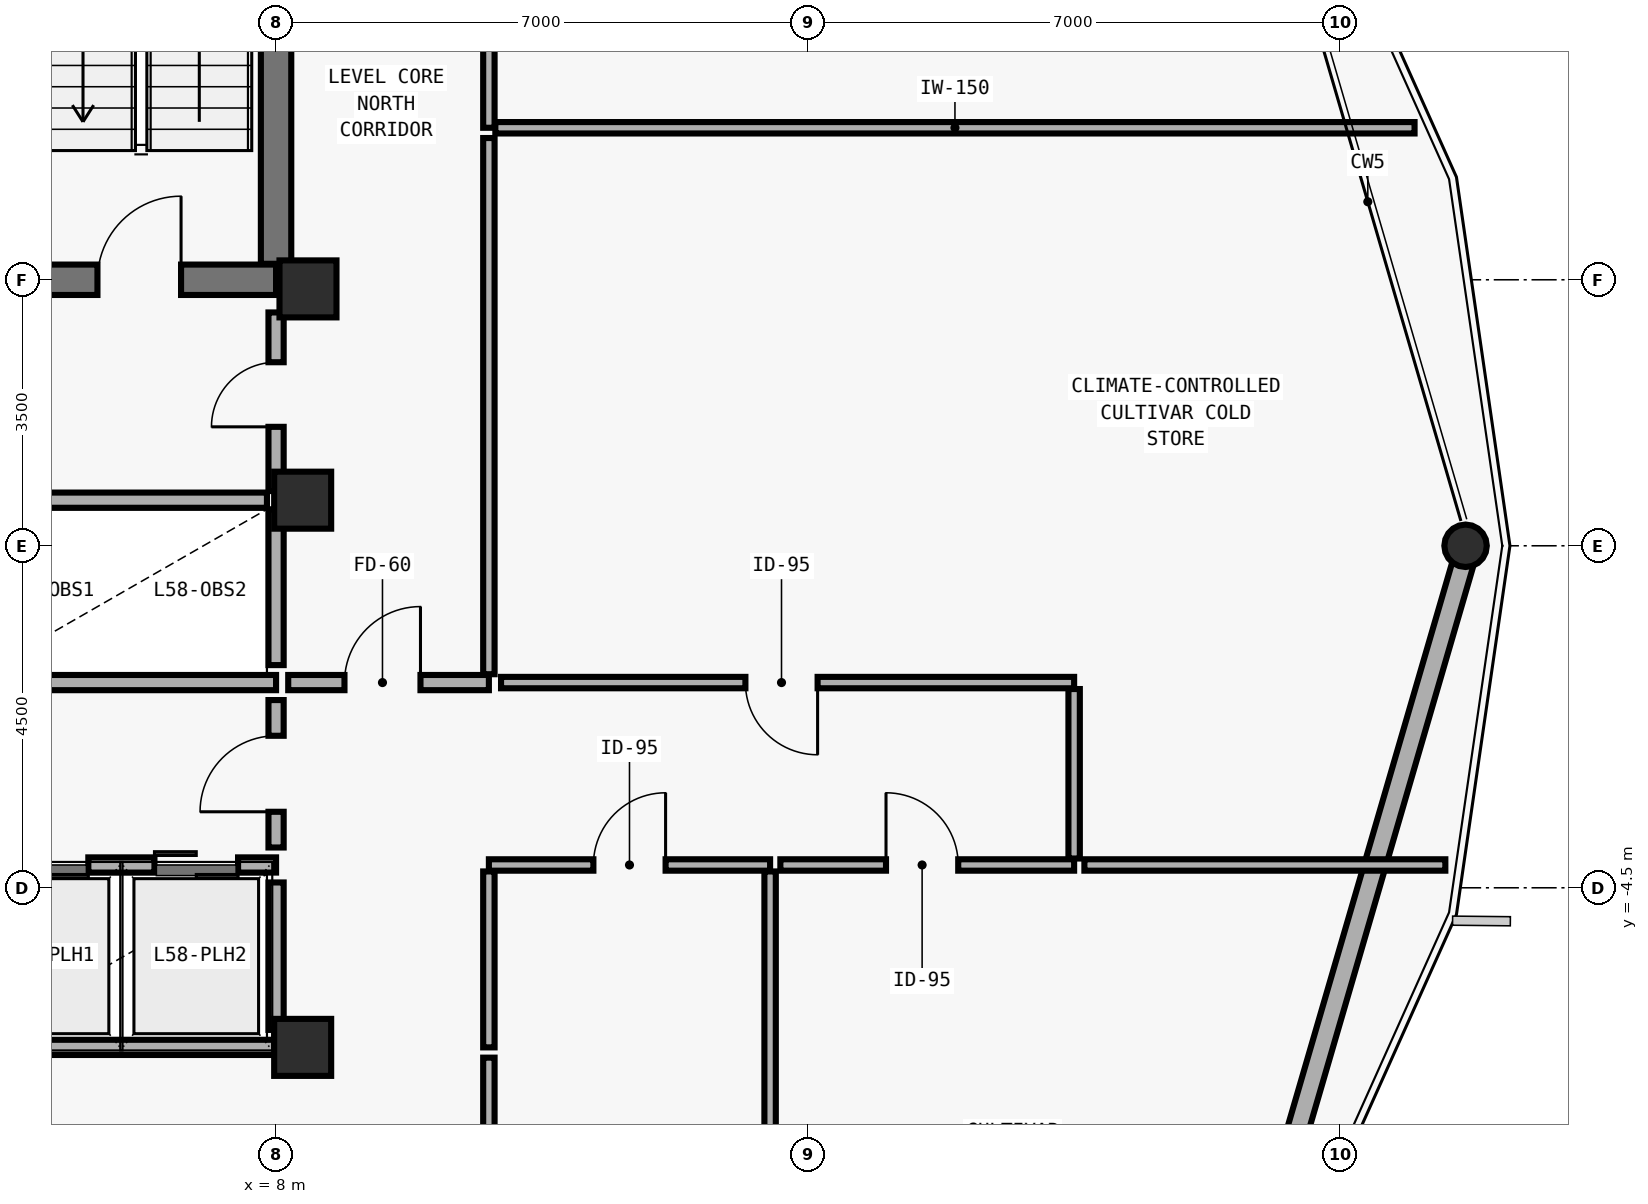
"""IFC4 building model, lengths in metres.
Left out: names, types, materials, properties, quantities, classifications, styles, units other than length and angle.
Written with IfcOpenShell. Run it as: python <this file> out.ifc"""

import sys

from ifc_helpers import new_model, si_unit, direction, frame, frame_2d, origin, origin_2d, place, context, subcontext, project, spatial, rectangle, hollow_circle, extrude, element, fill, save


model = new_model("IFC4")
c1 = context("Model", 3, precision=1e-05, world=origin(), true_north=direction((0.0, 1.0)))
c2 = subcontext(c1, "Body", "Model", "MODEL_VIEW")
j1 = project(units=[si_unit("LENGTHUNIT", "METRE"), si_unit("PLANEANGLEUNIT", "RADIAN")], contexts=[c1])
p1 = place(None, origin())
s1 = spatial("IfcSite", under=j1, at=p1, CompositionType="ELEMENT")
p2 = place(p1, origin())
s2 = spatial("IfcBuilding", under=s1, at=p2, CompositionType="ELEMENT")
p3 = place(p2, frame((0.0, 0.0, 229.2)))
s3 = spatial("IfcBuildingStorey", under=s2, at=p3, CompositionType="ELEMENT", Elevation=229.2)
p4 = place(p3, frame((-2.0, 3.5, 0.0), z_axis=(0.0, 0.0, 1.0), x_axis=(1.0, 0.0, 0.0)))
e1 = element("IfcWall", 1, at=p4, inside=s3, PredefinedType="SHEAR", context=c2, shape_type="SweptSolid", body=[
    extrude(rectangle(XDim=10.0, YDim=0.4, at=frame_2d((5.0, 0.0))), origin(), (0.0, 0.0, 1.0), 3.592),
])
p5 = place(p4, frame((1.65, 0.0, 0.0)))
e2 = element("IfcOpeningElement", 2, at=p5, cuts=e1, PredefinedType="OPENING", context=c2, shape_type="SweptSolid", body=[
    extrude(rectangle(XDim=1.1, YDim=2.15, at=frame_2d((0.55, 1.075))), frame((0.0, 0.21, 0.0), z_axis=(0.0, -1.0, 0.0), x_axis=(1.0, 0.0, 0.0)), (0.0, 0.0, 1.0), 0.42),
])
p6 = place(p4, frame((7.65, 0.0, 0.0)))
e3 = element("IfcOpeningElement", 3, at=p6, cuts=e1, PredefinedType="OPENING", context=c2, shape_type="SweptSolid", body=[
    extrude(rectangle(XDim=1.1, YDim=2.15, at=frame_2d((0.55, 1.075))), frame((0.0, 0.21, 0.0), z_axis=(0.0, -1.0, 0.0), x_axis=(1.0, 0.0, 0.0)), (0.0, 0.0, 1.0), 0.42),
])
p7 = place(p4, frame((3.72, 0.0, 0.0)))
e4 = element("IfcOpeningElement", 4, at=p7, cuts=e1, PredefinedType="OPENING", context=c2, shape_type="SweptSolid", body=[
    extrude(rectangle(XDim=1.1, YDim=2.2, at=frame_2d((0.55, 1.1))), frame((0.0, 0.21, 0.0), z_axis=(0.0, -1.0, 0.0), x_axis=(1.0, 0.0, 0.0)), (0.0, 0.0, 1.0), 0.42),
])
p8 = place(p4, frame((5.18, 0.0, 0.0)))
e5 = element("IfcOpeningElement", 5, at=p8, cuts=e1, PredefinedType="OPENING", context=c2, shape_type="SweptSolid", body=[
    extrude(rectangle(XDim=1.1, YDim=2.2, at=frame_2d((0.55, 1.1))), frame((0.0, 0.21, 0.0), z_axis=(0.0, -1.0, 0.0), x_axis=(1.0, 0.0, 0.0)), (0.0, 0.0, 1.0), 0.42),
])
p9 = place(p3, frame((8.0, 3.71, 0.0), z_axis=(0.0, 0.0, 1.0), x_axis=(0.0, 1.0, 0.0)))
e6 = element("IfcWall", 6, at=p9, inside=s3, PredefinedType="SHEAR", context=c2, shape_type="SweptSolid", body=[
    extrude(rectangle(XDim=8.58, YDim=0.4, at=frame_2d((4.29, 0.0))), origin(), (0.0, 0.0, 1.0), 3.592),
])
for number, where, z_axis, x_axis in (
    (7, (8.42, 3.38, 0.0), (0.0, 0.0, 1.0), (1.0, 0.0, 0.0)),
    (8, (8.35, 0.6, 0.0), (0.0, 0.0, 1.0), (1.0, 0.0, 0.0)),
    (9, (8.35, -6.6, 0.0), (0.0, 0.0, 1.0), (1.0, 0.0, 0.0)),
):
    element("IfcColumn", number, at=place(p3, frame(where, z_axis=z_axis, x_axis=x_axis)), inside=s3, PredefinedType="COLUMN", context=c2, shape_type="SweptSolid", body=[
        extrude(rectangle(XDim=0.75, YDim=0.75, at=origin_2d()), origin(), (0.0, 0.0, 1.0), 3.575),
    ])
p10 = place(p3, frame((23.684, 0.0, 0.0), z_axis=(-0.019050015053, 0.0, 0.999818531998), x_axis=(0.0, -1.0, 0.0)))
e10 = element("IfcColumn", 10, at=p10, inside=s3, PredefinedType="COLUMN", context=c2, shape_type="SweptSolid", body=[
    extrude(hollow_circle(Radius=0.28, WallThickness=0.02, at=origin_2d()), origin(), (0.0, 0.0, 1.0), 3.576),
])
p11 = place(p3, frame((23.618, -0.225, 0.0), z_axis=(0.0, 0.0, 1.0), x_axis=(-0.279948739232, -0.960014949572, 0.0)))
e11 = element("IfcWall", 11, at=p11, inside=s3, PredefinedType="SOLIDWALL", context=c2, shape_type="SweptSolid", body=[
    extrude(rectangle(XDim=8.962, YDim=0.28, at=frame_2d((4.481, 0.0))), origin(), (0.0, 0.0, 1.0), 2.97),
])
p12 = place(p3, frame((4.0, 0.6, 0.0), z_axis=(0.0, 0.0, 1.0), x_axis=(1.0, 0.0, 0.0)))
e12 = element("IfcWall", 12, at=p12, inside=s3, PredefinedType="SOLIDWALL", context=c2, shape_type="SweptSolid", body=[
    extrude(rectangle(XDim=3.88, YDim=0.2, at=frame_2d((1.94, 0.0))), origin(), (0.0, 0.0, 1.0), 3.072),
])
p13 = place(p3, frame((4.0, -1.8, 0.0), z_axis=(0.0, 0.0, 1.0), x_axis=(1.0, 0.0, 0.0)))
e13 = element("IfcWall", 13, at=p13, inside=s3, PredefinedType="SOLIDWALL", context=c2, shape_type="SweptSolid", body=[
    extrude(rectangle(XDim=4.0, YDim=0.2, at=frame_2d((2.0, 0.0))), origin(), (0.0, 0.0, 1.0), 3.36),
])
p14 = place(p3, frame((8.0, -1.57, 0.0), z_axis=(0.0, 0.0, 1.0), x_axis=(0.0, 1.0, 0.0)))
e14 = element("IfcWall", 14, at=p14, inside=s3, PredefinedType="SOLIDWALL", context=c2, shape_type="SweptSolid", body=[
    extrude(rectangle(XDim=2.05, YDim=0.2, at=frame_2d((1.025, 0.0))), origin(), (0.0, 0.0, 1.0), 3.072),
])
p15 = place(p3, frame((4.0, -4.2, 0.0), z_axis=(0.0, 0.0, 1.0), x_axis=(1.0, 0.0, 0.0)))
e15 = element("IfcWall", 15, at=p15, inside=s3, PredefinedType="SOLIDWALL", context=c2, shape_type="SweptSolid", body=[
    extrude(rectangle(XDim=4.0, YDim=0.2, at=frame_2d((2.0, 0.0))), origin(), (0.0, 0.0, 1.0), 3.36),
])
p16 = place(p15, frame((0.43, 0.0, 0.0)))
e16 = element("IfcOpeningElement", 16, at=p16, cuts=e15, PredefinedType="OPENING", context=c2, shape_type="SweptSolid", body=[
    extrude(rectangle(XDim=1.1, YDim=2.2, at=frame_2d((0.55, 1.1))), frame((0.0, 0.11, 0.0), z_axis=(0.0, -1.0, 0.0), x_axis=(1.0, 0.0, 0.0)), (0.0, 0.0, 1.0), 0.22),
])
p17 = place(p15, frame((2.4, 0.0, 0.0)))
e17 = element("IfcOpeningElement", 17, at=p17, cuts=e15, PredefinedType="OPENING", context=c2, shape_type="SweptSolid", body=[
    extrude(rectangle(XDim=1.1, YDim=2.2, at=frame_2d((0.55, 1.1))), frame((0.0, 0.11, 0.0), z_axis=(0.0, -1.0, 0.0), x_axis=(1.0, 0.0, 0.0)), (0.0, 0.0, 1.0), 0.22),
])
p18 = place(p3, frame((4.0, -6.6, 0.0), z_axis=(0.0, 0.0, 1.0), x_axis=(1.0, 0.0, 0.0)))
e18 = element("IfcWall", 18, at=p18, inside=s3, PredefinedType="SOLIDWALL", context=c2, shape_type="SweptSolid", body=[
    extrude(rectangle(XDim=4.0, YDim=0.2, at=frame_2d((2.0, 0.0))), origin(), (0.0, 0.0, 1.0), 3.072),
])
p19 = place(p3, frame((8.0, -6.37, 0.0), z_axis=(0.0, 0.0, 1.0), x_axis=(0.0, 1.0, 0.0)))
e19 = element("IfcWall", 19, at=p19, inside=s3, PredefinedType="SOLIDWALL", context=c2, shape_type="SweptSolid", body=[
    extrude(rectangle(XDim=1.94, YDim=0.2, at=frame_2d((0.97, 0.0))), origin(), (0.0, 0.0, 1.0), 3.072),
])
p20 = place(p3, frame((8.0, 0.72, 0.0), z_axis=(0.0, 0.0, 1.0), x_axis=(0.0, 1.0, 0.0)))
e20 = element("IfcWall", 20, at=p20, inside=s3, PredefinedType="MOVABLE", context=c2, shape_type="SweptSolid", body=[
    extrude(rectangle(XDim=2.35, YDim=0.2, at=frame_2d((1.175, 0.0))), origin(), (0.0, 0.0, 1.0), 2.692),
])
p21 = place(p20, frame((0.845, 0.0, 0.0)))
e21 = element("IfcOpeningElement", 21, at=p21, cuts=e20, PredefinedType="OPENING", context=c2, shape_type="SweptSolid", body=[
    extrude(rectangle(XDim=0.85, YDim=2.1, at=frame_2d((0.425, 1.05))), frame((0.0, 0.11, 0.0), z_axis=(0.0, -1.0, 0.0), x_axis=(1.0, 0.0, 0.0)), (0.0, 0.0, 1.0), 0.22),
])
p22 = place(p3, frame((8.0, -3.97, 0.0), z_axis=(0.0, 0.0, 1.0), x_axis=(0.0, 1.0, 0.0)))
e22 = element("IfcWall", 22, at=p22, inside=s3, PredefinedType="MOVABLE", context=c2, shape_type="SweptSolid", body=[
    extrude(rectangle(XDim=1.94, YDim=0.2, at=frame_2d((0.97, 0.0))), origin(), (0.0, 0.0, 1.0), 3.072),
])
p23 = place(p22, frame((0.47, 0.0, 0.0)))
e23 = element("IfcOpeningElement", 23, at=p23, cuts=e22, PredefinedType="OPENING", context=c2, shape_type="SweptSolid", body=[
    extrude(rectangle(XDim=1.0, YDim=2.1, at=frame_2d((0.5, 1.05))), frame((0.0, 0.11, 0.0), z_axis=(0.0, -1.0, 0.0), x_axis=(1.0, 0.0, 0.0)), (0.0, 0.0, 1.0), 0.22),
])
p24 = place(p3, frame((8.16, -1.8, 0.0), z_axis=(0.0, 0.0, 1.0), x_axis=(1.0, 0.0, 0.0)))
e24 = element("IfcWall", 24, at=p24, inside=s3, PredefinedType="MOVABLE", context=c2, shape_type="SweptSolid", body=[
    extrude(rectangle(XDim=2.64, YDim=0.2, at=frame_2d((1.32, 0.0))), origin(), (0.0, 0.0, 1.0), 3.36),
])
p25 = place(p24, frame((0.74, 0.0, 0.0)))
e25 = element("IfcOpeningElement", 25, at=p25, cuts=e24, PredefinedType="OPENING", context=c2, shape_type="SweptSolid", body=[
    extrude(rectangle(XDim=1.0, YDim=2.1, at=frame_2d((0.5, 1.05))), frame((0.0, 0.11, 0.0), z_axis=(0.0, -1.0, 0.0), x_axis=(1.0, 0.0, 0.0)), (0.0, 0.0, 1.0), 0.22),
])
p26 = place(p3, frame((10.8, -4.2, 0.0), z_axis=(0.0, 0.0, 1.0), x_axis=(1.0, 0.0, 0.0)))
e26 = element("IfcWall", 26, at=p26, inside=s3, PredefinedType="PARTITIONING", context=c2, shape_type="SweptSolid", body=[
    extrude(rectangle(XDim=3.7, YDim=0.15, at=frame_2d((1.85, 0.0))), origin(), (0.0, 0.0, 1.0), 3.36),
])
p27 = place(p26, frame((1.375, 0.0, 0.0)))
e27 = element("IfcOpeningElement", 27, at=p27, cuts=e26, PredefinedType="OPENING", context=c2, shape_type="SweptSolid", body=[
    extrude(rectangle(XDim=0.95, YDim=2.1, at=frame_2d((0.475, 1.05))), frame((0.0, 0.085, 0.0), z_axis=(0.0, -1.0, 0.0), x_axis=(1.0, 0.0, 0.0)), (0.0, 0.0, 1.0), 0.17),
])
p28 = place(p3, frame((14.635, -4.2, 0.0), z_axis=(0.0, 0.0, 1.0), x_axis=(1.0, 0.0, 0.0)))
e28 = element("IfcWall", 28, at=p28, inside=s3, PredefinedType="PARTITIONING", context=c2, shape_type="SweptSolid", body=[
    extrude(rectangle(XDim=3.865, YDim=0.15, at=frame_2d((1.933, 0.0))), origin(), (0.0, 0.0, 1.0), 3.36),
])
p29 = place(p28, frame((1.39, 0.0, 0.0)))
e29 = element("IfcOpeningElement", 29, at=p29, cuts=e28, PredefinedType="OPENING", context=c2, shape_type="SweptSolid", body=[
    extrude(rectangle(XDim=0.95, YDim=2.1, at=frame_2d((0.475, 1.05))), frame((0.0, 0.085, 0.0), z_axis=(0.0, -1.0, 0.0), x_axis=(1.0, 0.0, 0.0)), (0.0, 0.0, 1.0), 0.17),
])
p30 = place(p3, frame((18.5, -1.8, 0.0), z_axis=(0.0, 0.0, 1.0), x_axis=(-1.0, 0.0, 0.0)))
e30 = element("IfcWall", 30, at=p30, inside=s3, PredefinedType="PARTITIONING", context=c2, shape_type="SweptSolid", body=[
    extrude(rectangle(XDim=7.54, YDim=0.15, at=frame_2d((3.77, 0.0))), origin(), (0.0, 0.0, 1.0), 3.36),
])
p31 = place(p30, frame((3.375, 0.0, 0.0)))
e31 = element("IfcOpeningElement", 31, at=p31, cuts=e30, PredefinedType="OPENING", context=c2, shape_type="SweptSolid", body=[
    extrude(rectangle(XDim=0.95, YDim=2.1, at=frame_2d((0.475, 1.05))), frame((0.0, 0.085, 0.0), z_axis=(0.0, -1.0, 0.0), x_axis=(1.0, 0.0, 0.0)), (0.0, 0.0, 1.0), 0.17),
])
p32 = place(p3, frame((10.8, 5.5, 0.0), z_axis=(0.0, 0.0, 1.0), x_axis=(0.0, 1.0, 0.0)))
e32 = element("IfcWall", 32, at=p32, inside=s3, PredefinedType="PARTITIONING", context=c2, shape_type="SweptSolid", body=[
    extrude(rectangle(XDim=7.0, YDim=0.15, at=frame_2d((3.5, 0.0))), origin(), (0.0, 0.0, 1.0), 3.36),
])
p33 = place(p32, frame((3.025, 0.0, 0.0)))
e33 = element("IfcOpeningElement", 33, at=p33, cuts=e32, PredefinedType="OPENING", context=c2, shape_type="SweptSolid", body=[
    extrude(rectangle(XDim=0.95, YDim=2.1, at=frame_2d((0.475, 1.05))), frame((0.0, 0.085, 0.0), z_axis=(0.0, -1.0, 0.0), x_axis=(1.0, 0.0, 0.0)), (0.0, 0.0, 1.0), 0.17),
])
p34 = place(p3, frame((10.8, -6.6, 0.0), z_axis=(0.0, 0.0, 1.0), x_axis=(0.0, 1.0, 0.0)))
e34 = element("IfcWall", 34, at=p34, inside=s3, PredefinedType="PARTITIONING", context=c2, shape_type="SweptSolid", body=[
    extrude(rectangle(XDim=2.315, YDim=0.15, at=frame_2d((1.158, 0.0))), origin(), (0.0, 0.0, 1.0), 3.36),
])
p35 = place(p3, frame((10.8, -8.815, 0.0), z_axis=(0.0, 0.0, 1.0), x_axis=(0.0, 1.0, 0.0)))
e35 = element("IfcWall", 35, at=p35, inside=s3, PredefinedType="PARTITIONING", context=c2, shape_type="SweptSolid", body=[
    extrude(rectangle(XDim=2.08, YDim=0.15, at=frame_2d((1.04, 0.0))), origin(), (0.0, 0.0, 1.0), 3.36),
])
p36 = place(p3, frame((14.5, -4.285, 0.0), z_axis=(0.0, 0.0, 1.0), x_axis=(0.0, -1.0, 0.0)))
e36 = element("IfcWall", 36, at=p36, inside=s3, PredefinedType="PARTITIONING", context=c2, shape_type="SweptSolid", body=[
    extrude(rectangle(XDim=11.554, YDim=0.15, at=frame_2d((5.777, 0.0))), origin(), (0.0, 0.0, 1.0), 3.072),
])
p37 = place(p3, frame((18.635, -4.2, 0.0), z_axis=(0.0, 0.0, 1.0), x_axis=(1.0, 0.0, 0.0)))
e37 = element("IfcWall", 37, at=p37, inside=s3, PredefinedType="PARTITIONING", context=c2, shape_type="SweptSolid", body=[
    extrude(rectangle(XDim=4.749, YDim=0.15, at=frame_2d((2.375, 0.0))), origin(), (0.0, 0.0, 1.0), 3.36),
])
p38 = place(p3, frame((18.5, -4.115, 0.0), z_axis=(0.0, 0.0, 1.0), x_axis=(0.0, 1.0, 0.0)))
e38 = element("IfcWall", 38, at=p38, inside=s3, PredefinedType="PARTITIONING", context=c2, shape_type="SweptSolid", body=[
    extrude(rectangle(XDim=2.23, YDim=0.15, at=frame_2d((1.115, 0.0))), origin(), (0.0, 0.0, 1.0), 3.36),
])
p39 = place(p3, frame((10.8, -1.69, 0.0), z_axis=(0.0, 0.0, 1.0), x_axis=(0.0, 1.0, 0.0)))
e39 = element("IfcWall", 39, at=p39, inside=s3, PredefinedType="PARTITIONING", context=c2, shape_type="SweptSolid", body=[
    extrude(rectangle(XDim=7.055, YDim=0.15, at=frame_2d((3.527, 0.0))), origin(), (0.0, 0.0, 1.0), 3.36),
])
p40 = place(p3, frame((10.885, 5.5, 0.0), z_axis=(0.0, 0.0, 1.0), x_axis=(1.0, 0.0, 0.0)))
e40 = element("IfcWall", 40, at=p40, inside=s3, PredefinedType="PARTITIONING", context=c2, shape_type="SweptSolid", body=[
    extrude(rectangle(XDim=12.094, YDim=0.15, at=frame_2d((6.047, 0.0))), origin(), (0.0, 0.0, 1.0), 3.36),
])
p41 = place(p6, origin())
e41 = element("IfcDoor", 41, at=p41, inside=s3, OperationType="SINGLE_SWING_RIGHT", PredefinedType="DOOR", context=c2, shape_type="SweptSolid", body=[
    extrude(rectangle(XDim=1.1, YDim=2.15, at=frame_2d((0.55, 1.075))), frame((0.0, 0.025, 0.0), z_axis=(0.0, -1.0, 0.0), x_axis=(1.0, 0.0, 0.0)), (0.0, 0.0, 1.0), 0.05),
])
fill(e3, e41)
p42 = place(p21, origin())
e42 = element("IfcDoor", 42, at=p42, inside=s3, OperationType="SINGLE_SWING_LEFT", PredefinedType="DOOR", context=c2, shape_type="SweptSolid", body=[
    extrude(rectangle(XDim=0.85, YDim=2.1, at=frame_2d((0.425, 1.05))), frame((0.0, 0.025, 0.0), z_axis=(0.0, -1.0, 0.0), x_axis=(1.0, 0.0, 0.0)), (0.0, 0.0, 1.0), 0.05),
])
fill(e21, e42)
p43 = place(p23, origin())
e43 = element("IfcDoor", 43, at=p43, inside=s3, OperationType="SINGLE_SWING_LEFT", PredefinedType="DOOR", context=c2, shape_type="SweptSolid", body=[
    extrude(rectangle(XDim=1.0, YDim=2.1, at=frame_2d((0.5, 1.05))), frame((0.0, 0.025, 0.0), z_axis=(0.0, -1.0, 0.0), x_axis=(1.0, 0.0, 0.0)), (0.0, 0.0, 1.0), 0.05),
])
fill(e23, e43)
p44 = place(p25, origin())
e44 = element("IfcDoor", 44, at=p44, inside=s3, OperationType="SINGLE_SWING_RIGHT", PredefinedType="DOOR", context=c2, shape_type="SweptSolid", body=[
    extrude(rectangle(XDim=1.0, YDim=2.1, at=frame_2d((0.5, 1.05))), frame((0.0, 0.025, 0.0), z_axis=(0.0, -1.0, 0.0), x_axis=(1.0, 0.0, 0.0)), (0.0, 0.0, 1.0), 0.05),
])
fill(e25, e44)
p45 = place(p27, origin())
e45 = element("IfcDoor", 45, at=p45, inside=s3, OperationType="SINGLE_SWING_RIGHT", PredefinedType="DOOR", context=c2, shape_type="SweptSolid", body=[
    extrude(rectangle(XDim=0.95, YDim=2.1, at=frame_2d((0.475, 1.05))), frame((0.0, 0.025, 0.0), z_axis=(0.0, -1.0, 0.0), x_axis=(1.0, 0.0, 0.0)), (0.0, 0.0, 1.0), 0.05),
])
fill(e27, e45)
p46 = place(p29, origin())
e46 = element("IfcDoor", 46, at=p46, inside=s3, OperationType="SINGLE_SWING_LEFT", PredefinedType="DOOR", context=c2, shape_type="SweptSolid", body=[
    extrude(rectangle(XDim=0.95, YDim=2.1, at=frame_2d((0.475, 1.05))), frame((0.0, 0.025, 0.0), z_axis=(0.0, -1.0, 0.0), x_axis=(1.0, 0.0, 0.0)), (0.0, 0.0, 1.0), 0.05),
])
fill(e29, e46)
p47 = place(p31, origin())
e47 = element("IfcDoor", 47, at=p47, inside=s3, OperationType="SINGLE_SWING_LEFT", PredefinedType="DOOR", context=c2, shape_type="SweptSolid", body=[
    extrude(rectangle(XDim=0.95, YDim=2.1, at=frame_2d((0.475, 1.05))), frame((0.0, 0.025, 0.0), z_axis=(0.0, -1.0, 0.0), x_axis=(1.0, 0.0, 0.0)), (0.0, 0.0, 1.0), 0.05),
])
fill(e31, e47)
p48 = place(p16, origin())
e48 = element("IfcDoor", 48, at=p48, inside=s3, OperationType="DOUBLE_DOOR_SLIDING", PredefinedType="DOOR", context=c2, shape_type="SweptSolid", body=[
    extrude(rectangle(XDim=1.1, YDim=2.2, at=frame_2d((0.55, 1.1))), frame((0.0, 0.025, 0.0), z_axis=(0.0, -1.0, 0.0), x_axis=(1.0, 0.0, 0.0)), (0.0, 0.0, 1.0), 0.05),
])
fill(e16, e48)
p49 = place(p17, origin())
e49 = element("IfcDoor", 49, at=p49, inside=s3, OperationType="DOUBLE_DOOR_SLIDING", PredefinedType="DOOR", context=c2, shape_type="SweptSolid", body=[
    extrude(rectangle(XDim=1.1, YDim=2.2, at=frame_2d((0.55, 1.1))), frame((0.0, 0.025, 0.0), z_axis=(0.0, -1.0, 0.0), x_axis=(1.0, 0.0, 0.0)), (0.0, 0.0, 1.0), 0.05),
])
fill(e17, e49)
save(model, sys.argv[1])
